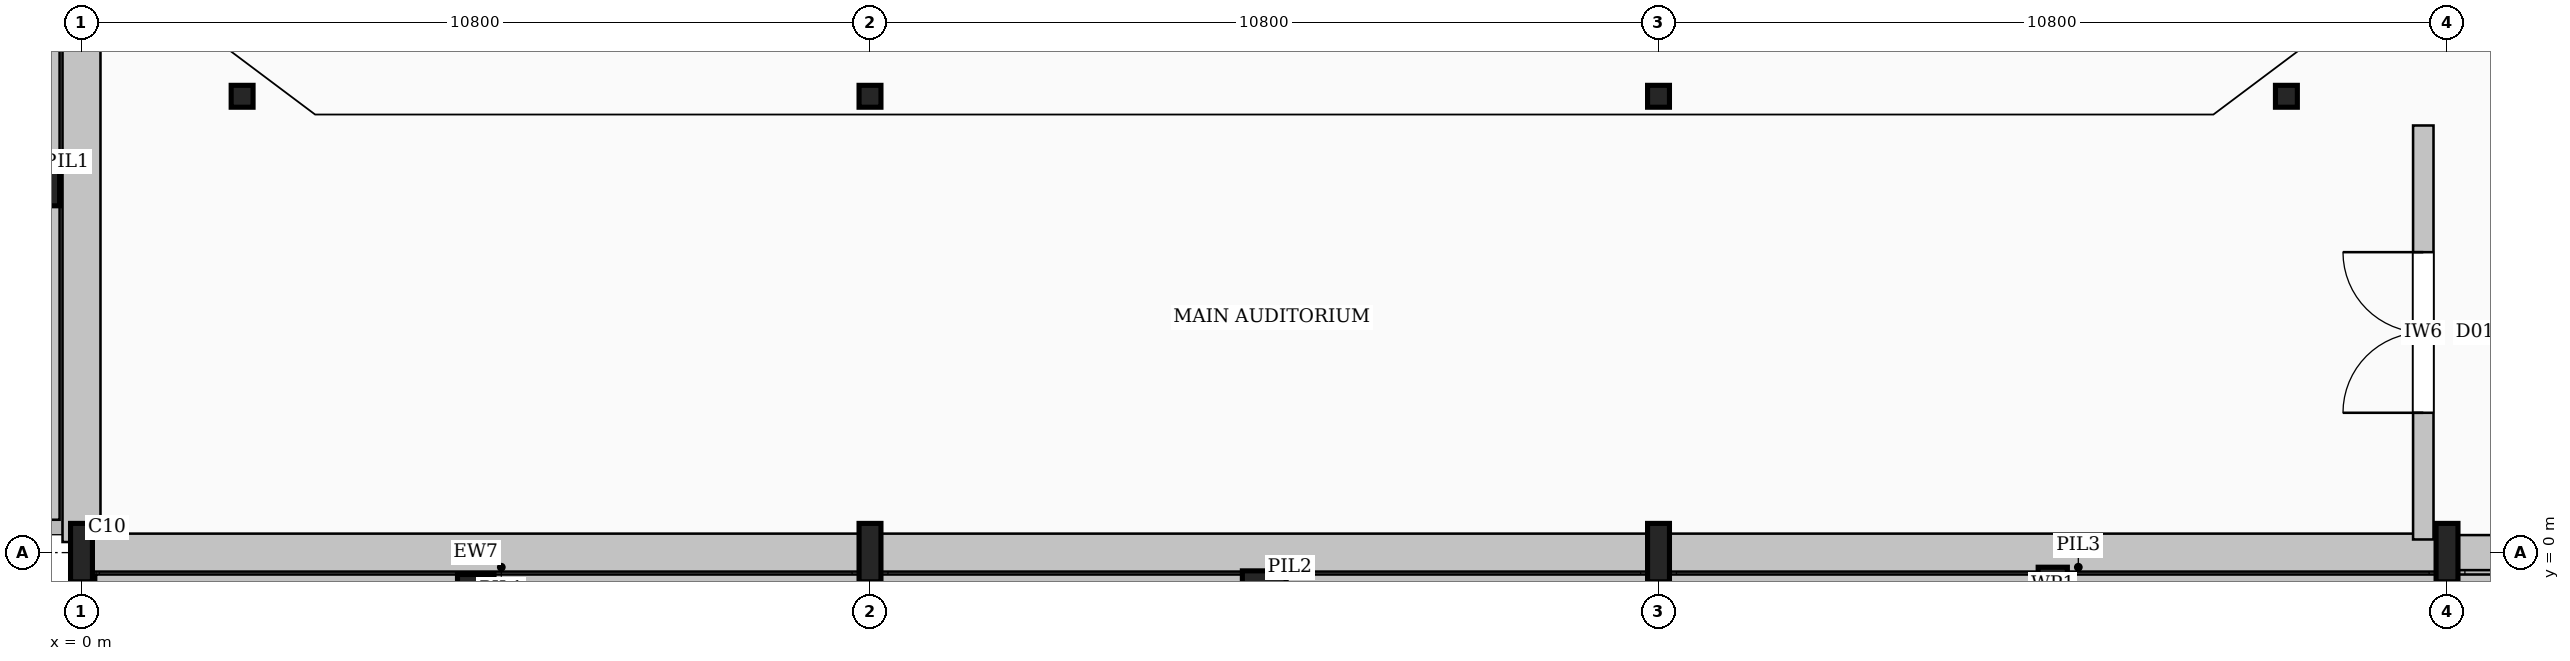
"""IFC4 building model, lengths in metres.
Left out: names, types, materials, properties, quantities, classifications, styles, units other than length and angle.
Written with IfcOpenShell. Run it as: python <this file> out.ifc"""

import sys

from ifc_helpers import new_model, si_unit, direction, frame, frame_2d, origin, origin_2d, place, context, subcontext, project, spatial, rectangle, i_section, extrude, element, fill, save


model = new_model("IFC4")
c1 = context("Model", 3, precision=1e-05, world=origin(), true_north=direction((0.0, 1.0)))
c2 = subcontext(c1, "Body", "Model", "MODEL_VIEW")
j1 = project(units=[si_unit("LENGTHUNIT", "METRE"), si_unit("PLANEANGLEUNIT", "RADIAN")], contexts=[c1])
p1 = place(None, origin())
s1 = spatial("IfcSite", under=j1, at=p1, CompositionType="ELEMENT")
p2 = place(p1, origin())
s2 = spatial("IfcBuilding", under=s1, at=p2, CompositionType="ELEMENT")
p3 = place(p2, origin())
s3 = spatial("IfcBuildingStorey", under=s2, at=p3, CompositionType="ELEMENT", Elevation=0.0)
for number, where, z_axis, x_axis in (
    (1, (0.0, 0.0, 0.0), (0.0, 0.0, 1.0), (1.0, 0.0, 0.0)),
    (2, (10.8, 0.0, 0.0), (0.0, 0.0, 1.0), (1.0, 0.0, 0.0)),
    (3, (21.6, 0.0, 0.0), (0.0, 0.0, 1.0), (1.0, 0.0, 0.0)),
    (4, (32.4, 0.0, 0.0), (0.0, 0.0, 1.0), (1.0, 0.0, 0.0)),
):
    element("IfcColumn", number, at=place(p3, frame(where, z_axis=z_axis, x_axis=x_axis)), inside=s3, PredefinedType="COLUMN", context=c2, shape_type="SweptSolid", body=[
        extrude(i_section(OverallWidth=0.3, OverallDepth=0.8, WebThickness=0.018, FlangeThickness=0.033, FilletRadius=0.03, at=origin_2d()), origin(), (0.0, 0.0, 1.0), 4.8),
    ])
for number, where, z_axis, x_axis in (
    (5, (2.2, 6.25, 0.0), (0.0, 0.0, 1.0), (1.0, 0.0, 0.0)),
    (6, (10.8, 6.25, 0.0), (0.0, 0.0, 1.0), (1.0, 0.0, 0.0)),
    (7, (21.6, 6.25, 0.0), (0.0, 0.0, 1.0), (1.0, 0.0, 0.0)),
    (8, (30.2, 6.25, 0.0), (0.0, 0.0, 1.0), (1.0, 0.0, 0.0)),
):
    element("IfcColumn", number, at=place(p3, frame(where, z_axis=z_axis, x_axis=x_axis)), inside=s3, PredefinedType="COLUMN", context=c2, shape_type="SweptSolid", body=[
        extrude(i_section(OverallWidth=0.3, OverallDepth=0.3, WebThickness=0.011, FlangeThickness=0.019, FilletRadius=0.027, at=origin_2d()), origin(), (0.0, 0.0, 1.0), 0.32),
    ])
p4 = place(p3, frame((0.2, -0.43, -1.38), z_axis=(0.0, 0.0, 1.0), x_axis=(1.0, 0.0, 0.0)))
e9 = element("IfcWall", 9, at=p4, inside=s3, PredefinedType="PARAPET", context=c2, shape_type="SweptSolid", body=[
    extrude(rectangle(XDim=53.6, YDim=0.26, at=frame_2d((26.8, 0.0))), origin(), (0.0, 0.0, 1.0), 1.36),
])
p5 = place(p3, frame((-0.43, 0.45, -1.38), z_axis=(0.0, 0.0, 1.0), x_axis=(0.0, 1.0, 0.0)))
e10 = element("IfcWall", 10, at=p5, inside=s3, PredefinedType="PARAPET", context=c2, shape_type="SweptSolid", body=[
    extrude(rectangle(XDim=39.1, YDim=0.26, at=frame_2d((19.55, 0.0))), origin(), (0.0, 0.0, 1.0), 1.36),
])
p6 = place(p3, frame((0.0, 9.855, 0.0), z_axis=(0.0, 0.0, 1.0), x_axis=(0.0, -1.0, 0.0)))
e11 = element("IfcWall", 11, at=p6, inside=s3, PredefinedType="SOLIDWALL", context=c2, shape_type="SweptSolid", body=[
    extrude(rectangle(XDim=9.71, YDim=0.52, at=frame_2d((4.855, 0.0))), origin(), (0.0, 0.0, 1.0), 4.56),
])
for number, where, z_axis, x_axis in (
    (12, (0.145, 0.0, 0.0), (0.0, 0.0, 1.0), (1.0, 0.0, 0.0)),
    (13, (10.945, 0.0, 0.0), (0.0, 0.0, 1.0), (1.0, 0.0, 0.0)),
):
    element("IfcWall", number, at=place(p3, frame(where, z_axis=z_axis, x_axis=x_axis)), inside=s3, PredefinedType="SOLIDWALL", context=c2, shape_type="SweptSolid", body=[
        extrude(rectangle(XDim=10.51, YDim=0.52, at=frame_2d((5.255, 0.0))), origin(), (0.0, 0.0, 1.0), 4.069),
    ])
p7 = place(p3, frame((21.745, 0.0, 0.0), z_axis=(0.0, 0.0, 1.0), x_axis=(1.0, 0.0, 0.0)))
e14 = element("IfcWall", 14, at=p7, inside=s3, PredefinedType="SOLIDWALL", context=c2, shape_type="SweptSolid", body=[
    extrude(rectangle(XDim=10.51, YDim=0.52, at=frame_2d((5.255, 0.0))), origin(), (0.0, 0.0, 1.0), 4.069),
])
p8 = place(p3, frame((32.545, 0.0, 0.0), z_axis=(0.0, 0.0, 1.0), x_axis=(1.0, 0.0, 0.0)))
e15 = element("IfcWall", 15, at=p8, inside=s3, PredefinedType="STANDARD", context=c2, shape_type="SweptSolid", body=[
    extrude(rectangle(XDim=10.51, YDim=0.48, at=frame_2d((5.255, 0.0))), origin(), (0.0, 0.0, 1.0), 4.069),
])
p9 = place(p8, frame((4.255, 0.0, 0.0)))
e16 = element("IfcOpeningElement", 16, at=p9, cuts=e15, PredefinedType="OPENING", context=c2, shape_type="SweptSolid", body=[
    extrude(rectangle(XDim=2.0, YDim=2.3, at=frame_2d((1.0, 1.15))), frame((0.0, 0.25, 0.0), z_axis=(0.0, -1.0, 0.0), x_axis=(1.0, 0.0, 0.0)), (0.0, 0.0, 1.0), 0.5),
])
p10 = place(p3, frame((5.4, -0.55, 0.0), z_axis=(0.0, 0.0, 1.0), x_axis=(1.0, 0.0, 0.0)))
e17 = element("IfcColumn", 17, at=p10, inside=s3, PredefinedType="PILASTER", context=c2, shape_type="SweptSolid", body=[
    extrude(rectangle(XDim=0.5, YDim=0.5, at=origin_2d()), origin(), (0.0, 0.0, 1.0), 4.8),
])
p11 = place(p3, frame((16.2, -0.55, 0.0), z_axis=(0.0, 0.0, 1.0), x_axis=(1.0, 0.0, 0.0)))
e18 = element("IfcColumn", 18, at=p11, inside=s3, PredefinedType="PILASTER", context=c2, shape_type="SweptSolid", body=[
    extrude(rectangle(XDim=0.6, YDim=0.6, at=origin_2d()), origin(), (0.0, 0.0, 1.0), 4.8),
])
p12 = place(p3, frame((27.0, -0.55, 0.0), z_axis=(0.0, 0.0, 1.0), x_axis=(1.0, 0.0, 0.0)))
e19 = element("IfcColumn", 19, at=p12, inside=s3, PredefinedType="PILASTER", context=c2, shape_type="SweptSolid", body=[
    extrude(rectangle(XDim=0.4, YDim=0.7, at=origin_2d()), origin(), (0.0, 0.0, 1.0), 4.8),
])
p13 = place(p3, frame((-0.55, 5.0, 0.0), z_axis=(0.0, 0.0, 1.0), x_axis=(1.0, 0.0, 0.0)))
e20 = element("IfcColumn", 20, at=p13, inside=s3, PredefinedType="PILASTER", context=c2, shape_type="SweptSolid", body=[
    extrude(rectangle(XDim=0.5, YDim=0.5, at=origin_2d()), origin(), (0.0, 0.0, 1.0), 4.8),
])
p14 = place(p3, frame((32.075, 0.18, 0.0), z_axis=(0.0, 0.0, 1.0), x_axis=(0.0, 1.0, 0.0)))
e21 = element("IfcWall", 21, at=p14, inside=s3, PredefinedType="SOLIDWALL", context=c2, shape_type="SweptSolid", body=[
    extrude(rectangle(XDim=5.67, YDim=0.28, at=frame_2d((2.835, 0.0))), origin(), (0.0, 0.0, 1.0), 4.52),
])
p15 = place(p14, frame((1.735, 0.0, 0.0)))
e22 = element("IfcOpeningElement", 22, at=p15, cuts=e21, PredefinedType="OPENING", context=c2, shape_type="SweptSolid", body=[
    extrude(rectangle(XDim=2.2, YDim=2.5, at=frame_2d((1.1, 1.25))), frame((0.0, 0.15, 0.0), z_axis=(0.0, -1.0, 0.0), x_axis=(1.0, 0.0, 0.0)), (0.0, 0.0, 1.0), 0.3),
])
p16 = place(p15, origin())
e23 = element("IfcDoor", 23, at=p16, inside=s3, OperationType="DOUBLE_DOOR_SINGLE_SWING", PredefinedType="DOOR", context=c2, shape_type="SweptSolid", body=[
    extrude(rectangle(XDim=2.2, YDim=2.5, at=frame_2d((1.1, 1.25))), frame((0.0, 0.025, 0.0), z_axis=(0.0, -1.0, 0.0), x_axis=(1.0, 0.0, 0.0)), (0.0, 0.0, 1.0), 0.05),
])
fill(e22, e23)
save(model, sys.argv[1])
